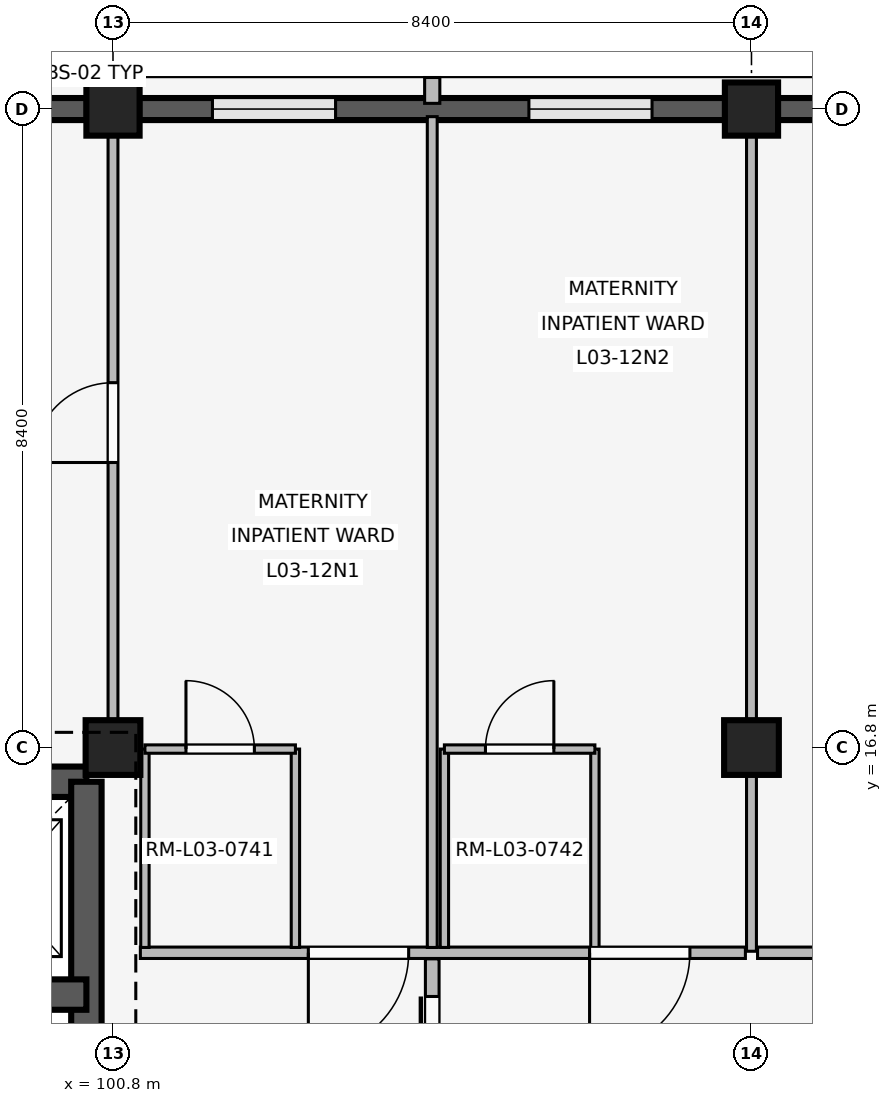
"""IFC4 building model, lengths in metres.
Left out: names, types, materials, properties, quantities, classifications, styles, units other than length and angle.
Written with IfcOpenShell. Run it as: python <this file> out.ifc"""

import sys

from ifc_helpers import new_model, si_unit, direction, frame, frame_2d, origin, origin_2d, place, context, subcontext, project, spatial, rectangle, extrude, element, fill, save


model = new_model("IFC4")
c1 = context("Model", 3, precision=1e-05, world=origin(), true_north=direction((0.0, 1.0)))
c2 = subcontext(c1, "Body", "Model", "MODEL_VIEW")
j1 = project(units=[si_unit("LENGTHUNIT", "METRE"), si_unit("PLANEANGLEUNIT", "RADIAN")], contexts=[c1])
p1 = place(None, origin())
s1 = spatial("IfcSite", under=j1, at=p1, CompositionType="ELEMENT")
p2 = place(p1, origin())
s2 = spatial("IfcBuilding", under=s1, at=p2, CompositionType="ELEMENT")
p3 = place(p2, frame((0.0, 0.0, 12.9)))
s3 = spatial("IfcBuildingStorey", under=s2, at=p3, CompositionType="ELEMENT", Elevation=12.9)
p4 = place(p3, frame((100.8, 16.8, 0.0), z_axis=(0.0, 0.0, 1.0), x_axis=(1.0, 0.0, 0.0)))
e1 = element("IfcColumn", 1, at=p4, inside=s3, PredefinedType="COLUMN", context=c2, shape_type="SweptSolid", body=[
    extrude(rectangle(XDim=0.72, YDim=0.72, at=origin_2d()), origin(), (0.0, 0.0, 1.0), 3.3),
])
p5 = place(p3, frame((100.8, 25.2, 0.0), z_axis=(0.0, 0.0, 1.0), x_axis=(1.0, 0.0, 0.0)))
e2 = element("IfcColumn", 2, at=p5, inside=s3, PredefinedType="COLUMN", context=c2, shape_type="SweptSolid", body=[
    extrude(rectangle(XDim=0.7, YDim=0.7, at=origin_2d()), origin(), (0.0, 0.0, 1.0), 3.3),
])
p6 = place(p3, frame((109.2, 16.8, 0.0), z_axis=(0.0, 0.0, 1.0), x_axis=(1.0, 0.0, 0.0)))
e3 = element("IfcColumn", 3, at=p6, inside=s3, PredefinedType="COLUMN", context=c2, shape_type="SweptSolid", body=[
    extrude(rectangle(XDim=0.72, YDim=0.72, at=origin_2d()), origin(), (0.0, 0.0, 1.0), 3.3),
])
p7 = place(p3, frame((109.2, 25.2, 0.0), z_axis=(0.0, 0.0, 1.0), x_axis=(1.0, 0.0, 0.0)))
e4 = element("IfcColumn", 4, at=p7, inside=s3, PredefinedType="COLUMN", context=c2, shape_type="SweptSolid", body=[
    extrude(rectangle(XDim=0.7, YDim=0.7, at=origin_2d()), origin(), (0.0, 0.0, 1.0), 3.3),
])
p8 = place(p3, frame((92.745, 25.2, 0.0), z_axis=(0.0, 0.0, 1.0), x_axis=(1.0, 0.0, 0.0)))
e5 = element("IfcWall", 5, at=p8, inside=s3, PredefinedType="SOLIDWALL", context=c2, shape_type="SweptSolid", body=[
    extrude(rectangle(XDim=7.71, YDim=0.29, at=frame_2d((3.855, 0.0))), origin(), (0.0, 0.0, 1.0), 2.44),
])
p9 = place(p8, frame((1.043, 0.0, 0.85)))
e6 = element("IfcOpeningElement", 6, at=p9, cuts=e5, PredefinedType="OPENING", context=c2, shape_type="SweptSolid", body=[
    extrude(rectangle(XDim=1.46, YDim=0.85, at=frame_2d((0.73, 0.425))), frame((0.0, 0.155, 0.0), z_axis=(0.0, -1.0, 0.0), x_axis=(1.0, 0.0, 0.0)), (0.0, 0.0, 1.0), 0.31),
])
p10 = place(p8, frame((5.207, 0.0, 0.85)))
e7 = element("IfcOpeningElement", 7, at=p10, cuts=e5, PredefinedType="OPENING", context=c2, shape_type="SweptSolid", body=[
    extrude(rectangle(XDim=1.46, YDim=0.85, at=frame_2d((0.73, 0.425))), frame((0.0, 0.155, 0.0), z_axis=(0.0, -1.0, 0.0), x_axis=(1.0, 0.0, 0.0)), (0.0, 0.0, 1.0), 0.31),
])
p11 = place(p3, frame((101.145, 25.2, 0.0), z_axis=(0.0, 0.0, 1.0), x_axis=(1.0, 0.0, 0.0)))
e8 = element("IfcWall", 8, at=p11, inside=s3, PredefinedType="SOLIDWALL", context=c2, shape_type="SweptSolid", body=[
    extrude(rectangle(XDim=7.71, YDim=0.29, at=frame_2d((3.855, 0.0))), origin(), (0.0, 0.0, 1.0), 2.44),
])
p12 = place(p11, frame((0.963, 0.0, 0.85)))
e9 = element("IfcOpeningElement", 9, at=p12, cuts=e8, PredefinedType="OPENING", context=c2, shape_type="SweptSolid", body=[
    extrude(rectangle(XDim=1.62, YDim=0.95, at=frame_2d((0.81, 0.475))), frame((0.0, 0.155, 0.0), z_axis=(0.0, -1.0, 0.0), x_axis=(1.0, 0.0, 0.0)), (0.0, 0.0, 1.0), 0.31),
])
p13 = place(p11, frame((5.127, 0.0, 0.85)))
e10 = element("IfcOpeningElement", 10, at=p13, cuts=e8, PredefinedType="OPENING", context=c2, shape_type="SweptSolid", body=[
    extrude(rectangle(XDim=1.62, YDim=0.95, at=frame_2d((0.81, 0.475))), frame((0.0, 0.155, 0.0), z_axis=(0.0, -1.0, 0.0), x_axis=(1.0, 0.0, 0.0)), (0.0, 0.0, 1.0), 0.31),
])
p14 = place(p3, frame((105.0, 25.275, 0.0), z_axis=(0.0, 0.0, 1.0), x_axis=(0.0, 1.0, 0.0)))
e11 = element("IfcWall", 11, at=p14, inside=s3, PredefinedType="ELEMENTEDWALL", context=c2, shape_type="SweptSolid", body=[
    extrude(rectangle(XDim=0.34, YDim=0.2, at=frame_2d((0.17, 0.0))), origin(), (0.0, 0.0, 1.0), 2.42),
])
p15 = place(p3, frame((109.545, 25.2, 0.0), z_axis=(0.0, 0.0, 1.0), x_axis=(1.0, 0.0, 0.0)))
e12 = element("IfcWall", 12, at=p15, inside=s3, PredefinedType="SOLIDWALL", context=c2, shape_type="SweptSolid", body=[
    extrude(rectangle(XDim=7.71, YDim=0.29, at=frame_2d((3.855, 0.0))), origin(), (0.0, 0.0, 1.0), 2.44),
])
p16 = place(p15, frame((1.043, 0.0, 0.85)))
e13 = element("IfcOpeningElement", 13, at=p16, cuts=e12, PredefinedType="OPENING", context=c2, shape_type="SweptSolid", body=[
    extrude(rectangle(XDim=1.46, YDim=0.85, at=frame_2d((0.73, 0.425))), frame((0.0, 0.155, 0.0), z_axis=(0.0, -1.0, 0.0), x_axis=(1.0, 0.0, 0.0)), (0.0, 0.0, 1.0), 0.31),
])
p17 = place(p15, frame((5.207, 0.0, 0.85)))
e14 = element("IfcOpeningElement", 14, at=p17, cuts=e12, PredefinedType="OPENING", context=c2, shape_type="SweptSolid", body=[
    extrude(rectangle(XDim=1.46, YDim=0.85, at=frame_2d((0.73, 0.425))), frame((0.0, 0.155, 0.0), z_axis=(0.0, -1.0, 0.0), x_axis=(1.0, 0.0, 0.0)), (0.0, 0.0, 1.0), 0.31),
])
p18 = place(p3, frame((92.95, 16.35, 0.0), z_axis=(0.0, 0.0, 1.0), x_axis=(1.0, 0.0, 0.0)))
e15 = element("IfcWall", 15, at=p18, inside=s3, PredefinedType="SHEAR", context=c2, shape_type="SweptSolid", body=[
    extrude(rectangle(XDim=7.5, YDim=0.4, at=frame_2d((3.75, 0.0))), origin(), (0.0, 0.0, 1.0), 3.02),
])
p19 = place(p3, frame((100.45, 8.8, 0.0), z_axis=(0.0, 0.0, 1.0), x_axis=(0.0, 1.0, 0.0)))
e16 = element("IfcWall", 16, at=p19, inside=s3, PredefinedType="SHEAR", context=c2, shape_type="SweptSolid", body=[
    extrude(rectangle(XDim=7.55, YDim=0.4, at=frame_2d((3.775, 0.0))), origin(), (0.0, 0.0, 1.0), 3.02),
])
p20 = place(p19, frame((2.4, 0.0, 0.0)))
e17 = element("IfcOpeningElement", 17, at=p20, cuts=e16, PredefinedType="OPENING", context=c2, shape_type="SweptSolid", body=[
    extrude(rectangle(XDim=1.2, YDim=2.2, at=frame_2d((0.6, 1.1))), frame((0.0, 0.21, 0.0), z_axis=(0.0, -1.0, 0.0), x_axis=(1.0, 0.0, 0.0)), (0.0, 0.0, 1.0), 0.42),
])
p21 = place(p3, frame((96.65, 13.55, 0.0), z_axis=(0.0, 0.0, 1.0), x_axis=(1.0, 0.0, 0.0)))
e18 = element("IfcWall", 18, at=p21, inside=s3, PredefinedType="SHEAR", context=c2, shape_type="SweptSolid", body=[
    extrude(rectangle(XDim=3.8, YDim=0.4, at=frame_2d((1.9, 0.0))), origin(), (0.0, 0.0, 1.0), 3.02),
])
p22 = place(p21, frame((0.32, 0.0, 0.0)))
e19 = element("IfcOpeningElement", 19, at=p22, cuts=e18, PredefinedType="OPENING", context=c2, shape_type="SweptSolid", body=[
    extrude(rectangle(XDim=1.4, YDim=2.25, at=frame_2d((0.7, 1.125))), frame((0.0, 0.21, 0.0), z_axis=(0.0, -1.0, 0.0), x_axis=(1.0, 0.0, 0.0)), (0.0, 0.0, 1.0), 0.42),
])
p23 = place(p21, frame((2.04, 0.0, 0.0)))
e20 = element("IfcOpeningElement", 20, at=p23, cuts=e18, PredefinedType="OPENING", context=c2, shape_type="SweptSolid", body=[
    extrude(rectangle(XDim=1.1, YDim=2.15, at=frame_2d((0.55, 1.075))), frame((0.0, 0.21, 0.0), z_axis=(0.0, -1.0, 0.0), x_axis=(1.0, 0.0, 0.0)), (0.0, 0.0, 1.0), 0.42),
])
p24 = place(p3, frame((100.8, 17.15, 0.0), z_axis=(0.0, 0.0, 1.0), x_axis=(0.0, 1.0, 0.0)))
e21 = element("IfcWall", 21, at=p24, inside=s3, PredefinedType="PARTITIONING", context=c2, shape_type="SweptSolid", body=[
    extrude(rectangle(XDim=7.91, YDim=0.13, at=frame_2d((3.955, 0.0))), origin(), (0.0, 0.0, 1.0), 2.42),
])
p25 = place(p24, frame((3.4, 0.0, 0.0)))
e22 = element("IfcOpeningElement", 22, at=p25, cuts=e21, PredefinedType="OPENING", context=c2, shape_type="SweptSolid", body=[
    extrude(rectangle(XDim=1.05, YDim=2.2, at=frame_2d((0.525, 1.1))), frame((0.0, 0.075, 0.0), z_axis=(0.0, -1.0, 0.0), x_axis=(1.0, 0.0, 0.0)), (0.0, 0.0, 1.0), 0.15),
])
p26 = place(p3, frame((109.12, 14.1, 0.0), z_axis=(0.0, 0.0, 1.0), x_axis=(-1.0, 0.0, 0.0)))
e23 = element("IfcWall", 23, at=p26, inside=s3, PredefinedType="PARTITIONING", context=c2, shape_type="SweptSolid", body=[
    extrude(rectangle(XDim=7.96, YDim=0.15, at=frame_2d((3.98, 0.0))), origin(), (0.0, 0.0, 1.0), 2.42),
])
p27 = place(p26, frame((0.73, 0.0, 0.0)))
e24 = element("IfcOpeningElement", 24, at=p27, cuts=e23, PredefinedType="OPENING", context=c2, shape_type="SweptSolid", body=[
    extrude(rectangle(XDim=1.32, YDim=2.25, at=frame_2d((0.66, 1.125))), frame((0.0, 0.085, 0.0), z_axis=(0.0, -1.0, 0.0), x_axis=(1.0, 0.0, 0.0)), (0.0, 0.0, 1.0), 0.17),
])
p28 = place(p26, frame((4.43, 0.0, 0.0)))
e25 = element("IfcOpeningElement", 25, at=p28, cuts=e23, PredefinedType="OPENING", context=c2, shape_type="SweptSolid", body=[
    extrude(rectangle(XDim=1.32, YDim=2.25, at=frame_2d((0.66, 1.125))), frame((0.0, 0.085, 0.0), z_axis=(0.0, -1.0, 0.0), x_axis=(1.0, 0.0, 0.0)), (0.0, 0.0, 1.0), 0.17),
])
p29 = place(p3, frame((105.0, 14.17, 0.0), z_axis=(0.0, 0.0, 1.0), x_axis=(0.0, 1.0, 0.0)))
e26 = element("IfcWall", 26, at=p29, inside=s3, PredefinedType="PARTITIONING", context=c2, shape_type="SweptSolid", body=[
    extrude(rectangle(XDim=10.93, YDim=0.13, at=frame_2d((5.465, 0.0))), origin(), (0.0, 0.0, 1.0), 2.42),
])
for number, where, z_axis, x_axis in (
    (27, (101.22, 14.17, 0.0), (0.0, 0.0, 1.0), (0.0, 1.0, 0.0)),
    (28, (103.2, 14.17, 0.0), (0.0, 0.0, 1.0), (0.0, 1.0, 0.0)),
):
    element("IfcWall", number, at=place(p3, frame(where, z_axis=z_axis, x_axis=x_axis)), inside=s3, PredefinedType="PARTITIONING", context=c2, shape_type="SweptSolid", body=[
        extrude(rectangle(XDim=2.61, YDim=0.11, at=frame_2d((1.305, 0.0))), origin(), (0.0, 0.0, 1.0), 2.42),
    ])
p30 = place(p3, frame((101.22, 16.78, 0.0), z_axis=(0.0, 0.0, 1.0), x_axis=(1.0, 0.0, 0.0)))
e29 = element("IfcWall", 29, at=p30, inside=s3, PredefinedType="PARTITIONING", context=c2, shape_type="SweptSolid", body=[
    extrude(rectangle(XDim=1.98, YDim=0.11, at=frame_2d((0.99, 0.0))), origin(), (0.0, 0.0, 1.0), 2.42),
])
p31 = place(p30, frame((0.54, 0.0, 0.0)))
e30 = element("IfcOpeningElement", 30, at=p31, cuts=e29, PredefinedType="OPENING", context=c2, shape_type="SweptSolid", body=[
    extrude(rectangle(XDim=0.9, YDim=2.1, at=frame_2d((0.45, 1.05))), frame((0.0, 0.065, 0.0), z_axis=(0.0, -1.0, 0.0), x_axis=(1.0, 0.0, 0.0)), (0.0, 0.0, 1.0), 0.13),
])
for number, where, z_axis, x_axis in (
    (31, (105.16, 14.17, 0.0), (0.0, 0.0, 1.0), (0.0, 1.0, 0.0)),
    (32, (107.14, 14.17, 0.0), (0.0, 0.0, 1.0), (0.0, 1.0, 0.0)),
):
    element("IfcWall", number, at=place(p3, frame(where, z_axis=z_axis, x_axis=x_axis)), inside=s3, PredefinedType="PARTITIONING", context=c2, shape_type="SweptSolid", body=[
        extrude(rectangle(XDim=2.61, YDim=0.11, at=frame_2d((1.305, 0.0))), origin(), (0.0, 0.0, 1.0), 2.42),
    ])
p32 = place(p3, frame((105.16, 16.78, 0.0), z_axis=(0.0, 0.0, 1.0), x_axis=(1.0, 0.0, 0.0)))
e33 = element("IfcWall", 33, at=p32, inside=s3, PredefinedType="PARTITIONING", context=c2, shape_type="SweptSolid", body=[
    extrude(rectangle(XDim=1.98, YDim=0.11, at=frame_2d((0.99, 0.0))), origin(), (0.0, 0.0, 1.0), 2.42),
])
p33 = place(p32, frame((0.54, 0.0, 0.0)))
e34 = element("IfcOpeningElement", 34, at=p33, cuts=e33, PredefinedType="OPENING", context=c2, shape_type="SweptSolid", body=[
    extrude(rectangle(XDim=0.9, YDim=2.1, at=frame_2d((0.45, 1.05))), frame((0.0, 0.065, 0.0), z_axis=(0.0, -1.0, 0.0), x_axis=(1.0, 0.0, 0.0)), (0.0, 0.0, 1.0), 0.13),
])
p34 = place(p3, frame((105.0, 11.18, 0.0), z_axis=(0.0, 0.0, 1.0), x_axis=(0.0, 1.0, 0.0)))
e35 = element("IfcWall", 35, at=p34, inside=s3, PredefinedType="PARTITIONING", context=c2, shape_type="SweptSolid", body=[
    extrude(rectangle(XDim=2.84, YDim=0.18, at=frame_2d((1.42, 0.0))), origin(), (0.0, 0.0, 1.0), 2.42),
])
p35 = place(p34, frame((0.495, 0.0, 0.0)))
e36 = element("IfcOpeningElement", 36, at=p35, cuts=e35, PredefinedType="OPENING", context=c2, shape_type="SweptSolid", body=[
    extrude(rectangle(XDim=1.85, YDim=2.3, at=frame_2d((0.925, 1.15))), frame((0.0, 0.1, 0.0), z_axis=(0.0, -1.0, 0.0), x_axis=(1.0, 0.0, 0.0)), (0.0, 0.0, 1.0), 0.2),
])
p36 = place(p3, frame((109.2, 14.12, 0.0), z_axis=(0.0, 0.0, 1.0), x_axis=(0.0, 1.0, 0.0)))
e37 = element("IfcWall", 37, at=p36, inside=s3, PredefinedType="PARTITIONING", context=c2, shape_type="SweptSolid", body=[
    extrude(rectangle(XDim=10.94, YDim=0.13, at=frame_2d((5.47, 0.0))), origin(), (0.0, 0.0, 1.0), 2.42),
])
p37 = place(p3, frame((117.52, 14.1, 0.0), z_axis=(0.0, 0.0, 1.0), x_axis=(-1.0, 0.0, 0.0)))
e38 = element("IfcWall", 38, at=p37, inside=s3, PredefinedType="PARTITIONING", context=c2, shape_type="SweptSolid", body=[
    extrude(rectangle(XDim=8.24, YDim=0.15, at=frame_2d((4.12, 0.0))), origin(), (0.0, 0.0, 1.0), 2.42),
])
p38 = place(p37, frame((3.495, 0.0, 0.0)))
e39 = element("IfcOpeningElement", 39, at=p38, cuts=e38, PredefinedType="OPENING", context=c2, shape_type="SweptSolid", body=[
    extrude(rectangle(XDim=1.25, YDim=2.2, at=frame_2d((0.625, 1.1))), frame((0.0, 0.085, 0.0), z_axis=(0.0, -1.0, 0.0), x_axis=(1.0, 0.0, 0.0)), (0.0, 0.0, 1.0), 0.17),
])
p39 = place(p12, origin())
e40 = element("IfcWindow", 40, at=p39, inside=s3, PartitioningType="SINGLE_PANEL", PredefinedType="WINDOW", context=c2, shape_type="SweptSolid", body=[
    extrude(rectangle(XDim=1.62, YDim=0.95, at=frame_2d((0.81, 0.475))), frame((0.0, 0.03, 0.0), z_axis=(0.0, -1.0, 0.0), x_axis=(1.0, 0.0, 0.0)), (0.0, 0.0, 1.0), 0.06),
])
fill(e9, e40)
p40 = place(p13, origin())
e41 = element("IfcWindow", 41, at=p40, inside=s3, PartitioningType="SINGLE_PANEL", PredefinedType="WINDOW", context=c2, shape_type="SweptSolid", body=[
    extrude(rectangle(XDim=1.62, YDim=0.95, at=frame_2d((0.81, 0.475))), frame((0.0, 0.03, 0.0), z_axis=(0.0, -1.0, 0.0), x_axis=(1.0, 0.0, 0.0)), (0.0, 0.0, 1.0), 0.06),
])
fill(e10, e41)
p41 = place(p25, origin())
e42 = element("IfcDoor", 42, at=p41, inside=s3, OperationType="SINGLE_SWING_LEFT", PredefinedType="DOOR", context=c2, shape_type="SweptSolid", body=[
    extrude(rectangle(XDim=1.05, YDim=2.2, at=frame_2d((0.525, 1.1))), frame((0.0, 0.025, 0.0), z_axis=(0.0, -1.0, 0.0), x_axis=(1.0, 0.0, 0.0)), (0.0, 0.0, 1.0), 0.05),
])
fill(e22, e42)
p42 = place(p27, origin())
e43 = element("IfcDoor", 43, at=p42, inside=s3, OperationType="SINGLE_SWING_RIGHT", PredefinedType="DOOR", context=c2, shape_type="SweptSolid", body=[
    extrude(rectangle(XDim=1.32, YDim=2.25, at=frame_2d((0.66, 1.125))), frame((0.0, 0.025, 0.0), z_axis=(0.0, -1.0, 0.0), x_axis=(1.0, 0.0, 0.0)), (0.0, 0.0, 1.0), 0.05),
])
fill(e24, e43)
p43 = place(p28, origin())
e44 = element("IfcDoor", 44, at=p43, inside=s3, OperationType="SINGLE_SWING_RIGHT", PredefinedType="DOOR", context=c2, shape_type="SweptSolid", body=[
    extrude(rectangle(XDim=1.32, YDim=2.25, at=frame_2d((0.66, 1.125))), frame((0.0, 0.025, 0.0), z_axis=(0.0, -1.0, 0.0), x_axis=(1.0, 0.0, 0.0)), (0.0, 0.0, 1.0), 0.05),
])
fill(e25, e44)
p44 = place(p31, origin())
e45 = element("IfcDoor", 45, at=p44, inside=s3, OperationType="SINGLE_SWING_LEFT", PredefinedType="DOOR", context=c2, shape_type="SweptSolid", body=[
    extrude(rectangle(XDim=0.9, YDim=2.1, at=frame_2d((0.45, 1.05))), frame((0.0, 0.025, 0.0), z_axis=(0.0, -1.0, 0.0), x_axis=(1.0, 0.0, 0.0)), (0.0, 0.0, 1.0), 0.05),
])
fill(e30, e45)
p45 = place(p33, origin())
e46 = element("IfcDoor", 46, at=p45, inside=s3, OperationType="SINGLE_SWING_RIGHT", PredefinedType="DOOR", context=c2, shape_type="SweptSolid", body=[
    extrude(rectangle(XDim=0.9, YDim=2.1, at=frame_2d((0.45, 1.05))), frame((0.0, 0.025, 0.0), z_axis=(0.0, -1.0, 0.0), x_axis=(1.0, 0.0, 0.0)), (0.0, 0.0, 1.0), 0.05),
])
fill(e34, e46)
p46 = place(p35, origin())
e47 = element("IfcDoor", 47, at=p46, inside=s3, OperationType="SLIDING_TO_LEFT", PredefinedType="DOOR", context=c2, shape_type="SweptSolid", body=[
    extrude(rectangle(XDim=1.85, YDim=2.3, at=frame_2d((0.925, 1.15))), frame((0.0, 0.025, 0.0), z_axis=(0.0, -1.0, 0.0), x_axis=(1.0, 0.0, 0.0)), (0.0, 0.0, 1.0), 0.05),
])
fill(e36, e47)
save(model, sys.argv[1])
